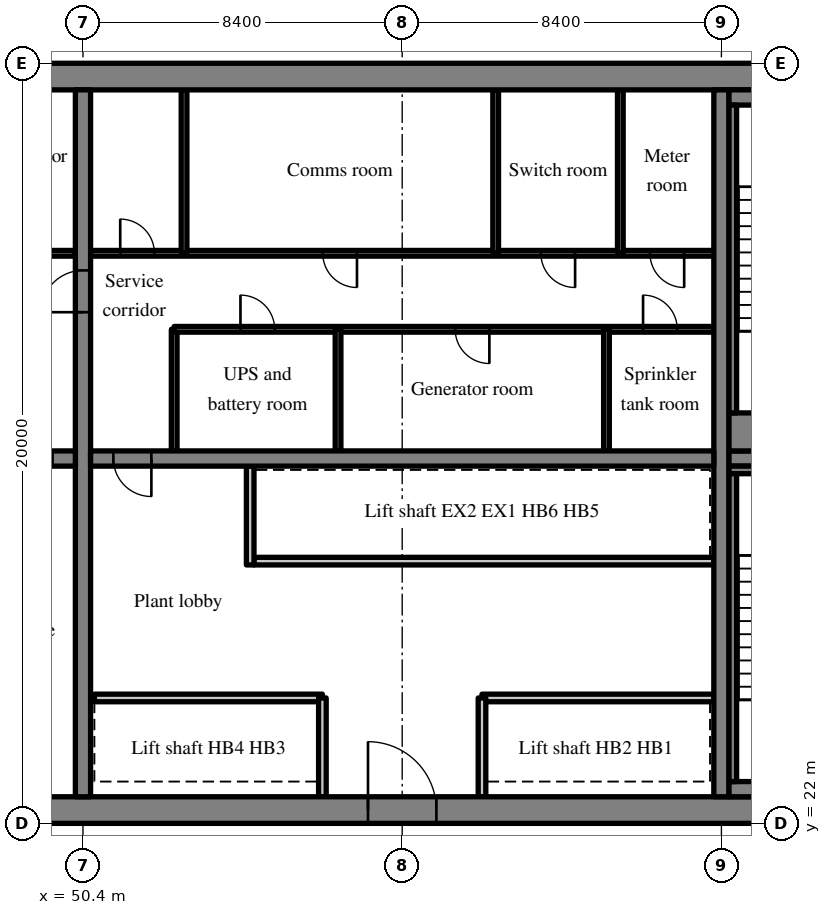
"""IFC4 building model, lengths in metres.
Left out: names, types, materials, properties, quantities, classifications, styles, units other than length and angle.
Written with IfcOpenShell. Run it as: python <this file> out.ifc"""

import sys

from ifc_helpers import new_model, si_unit, direction, frame, frame_2d, origin, place, context, subcontext, project, spatial, rectangle, extrude, source, transform, mapped, element, fill, save


model = new_model("IFC4")
c1 = context("Model", 3, precision=1e-05, world=origin(), true_north=direction((0.0, 1.0)))
c2 = subcontext(c1, "Body", "Model", "MODEL_VIEW")
j1 = project(units=[si_unit("LENGTHUNIT", "METRE"), si_unit("PLANEANGLEUNIT", "RADIAN")], contexts=[c1])
p1 = place(None, origin())
s1 = spatial("IfcSite", under=j1, at=p1, CompositionType="ELEMENT")
p2 = place(p1, origin())
s2 = spatial("IfcBuilding", under=s1, at=p2, CompositionType="ELEMENT")
p3 = place(p2, frame((0.0, 0.0, 201.0)))
s3 = spatial("IfcBuildingStorey", under=s2, at=p3, CompositionType="ELEMENT", Elevation=201.0)
m1 = source(origin(), c2, "Body", "SweptSolid", [
    extrude(rectangle(XDim=50.4, YDim=0.7, at=frame_2d((25.2, 0.0))), origin(), (0.0, 0.0, 1.0), 5.12),
])
p4 = place(p3, frame((25.2, 22.35, 0.0), z_axis=(0.0, 0.0, 1.0), x_axis=(1.0, 0.0, 0.0)))
e1 = element("IfcWall", 1, at=p4, inside=s3, PredefinedType="SHEAR", context=c2, shape_type="MappedRepresentation", body=[
    mapped(m1, transform((0.0, 0.0, 0.0), scale=1.0)),
])
m2 = source(origin(), c2, "Body", "SweptSolid", [
    extrude(rectangle(XDim=1.2, YDim=2.1, at=frame_2d((0.6, 1.05))), frame((0.0, 0.36, 0.0), z_axis=(0.0, -1.0, 0.0), x_axis=(1.0, 0.0, 0.0)), (0.0, 0.0, 1.0), 0.72),
])
p5 = place(p4, frame((22.25, 0.0, 0.0)))
e2 = element("IfcOpeningElement", 2, at=p5, cuts=e1, PredefinedType="OPENING", context=c2, shape_type="MappedRepresentation", body=[
    mapped(m2, transform((0.0, 0.0, 0.0), scale=1.0)),
])
m3 = source(origin(), c2, "Body", "SweptSolid", [
    extrude(rectangle(XDim=0.9, YDim=2.1, at=frame_2d((0.45, 1.05))), frame((0.0, 0.36, 0.0), z_axis=(0.0, -1.0, 0.0), x_axis=(1.0, 0.0, 0.0)), (0.0, 0.0, 1.0), 0.72),
])
p6 = place(p4, frame((15.75, 0.0, 0.0)))
e3 = element("IfcOpeningElement", 3, at=p6, cuts=e1, PredefinedType="OPENING", context=c2, shape_type="MappedRepresentation", body=[
    mapped(m3, transform((0.0, 0.0, 0.0), scale=1.0)),
])
p7 = place(p4, frame((18.75, 0.0, 0.0)))
e4 = element("IfcOpeningElement", 4, at=p7, cuts=e1, PredefinedType="OPENING", context=c2, shape_type="MappedRepresentation", body=[
    mapped(m3, transform((0.0, 0.0, 0.0), scale=1.0)),
])
p8 = place(p4, frame((11.2, 0.0, 0.0)))
e5 = element("IfcOpeningElement", 5, at=p8, cuts=e1, PredefinedType="OPENING", context=c2, shape_type="MappedRepresentation", body=[
    mapped(m3, transform((0.0, 0.0, 0.0), scale=1.0)),
])
m4 = source(origin(), c2, "Body", "SweptSolid", [
    extrude(rectangle(XDim=1.8, YDim=2.1, at=frame_2d((0.9, 1.05))), frame((0.0, 0.36, 0.0), z_axis=(0.0, -1.0, 0.0), x_axis=(1.0, 0.0, 0.0)), (0.0, 0.0, 1.0), 0.72),
])
p9 = place(p4, frame((32.7, 0.0, 0.0)))
e6 = element("IfcOpeningElement", 6, at=p9, cuts=e1, PredefinedType="OPENING", context=c2, shape_type="MappedRepresentation", body=[
    mapped(m4, transform((0.0, 0.0, 0.0), scale=1.0)),
])
p10 = place(p4, frame((6.475, 0.0, 0.0)))
e7 = element("IfcOpeningElement", 7, at=p10, cuts=e1, PredefinedType="OPENING", context=c2, shape_type="MappedRepresentation", body=[
    mapped(m2, transform((0.0, 0.0, 0.0), scale=1.0)),
])
p11 = place(p4, frame((47.875, 0.0, 0.0)))
e8 = element("IfcOpeningElement", 8, at=p11, cuts=e1, PredefinedType="OPENING", context=c2, shape_type="MappedRepresentation", body=[
    mapped(m2, transform((0.0, 0.0, 0.0), scale=1.0)),
])
p12 = place(p3, frame((25.2, 41.65, 0.0), z_axis=(0.0, 0.0, 1.0), x_axis=(1.0, 0.0, 0.0)))
e9 = element("IfcWall", 9, at=p12, inside=s3, PredefinedType="SHEAR", context=c2, shape_type="MappedRepresentation", body=[
    mapped(m1, transform((0.0, 0.0, 0.0), scale=1.0)),
])
m5 = source(origin(), c2, "Body", "SweptSolid", [
    extrude(rectangle(XDim=18.6, YDim=0.4, at=frame_2d((9.3, 0.0))), origin(), (0.0, 0.0, 1.0), 5.12),
])
p13 = place(p3, frame((50.4, 22.7, 0.0), z_axis=(0.0, 0.0, 1.0), x_axis=(0.0, 1.0, 0.0)))
e10 = element("IfcWall", 10, at=p13, inside=s3, PredefinedType="SHEAR", context=c2, shape_type="MappedRepresentation", body=[
    mapped(m5, transform((0.0, 0.0, 0.0), scale=1.0)),
])
m6 = source(origin(), c2, "Body", "SweptSolid", [
    extrude(rectangle(XDim=1.1, YDim=2.1, at=frame_2d((0.55, 1.05))), frame((0.0, 0.21, 0.0), z_axis=(0.0, -1.0, 0.0), x_axis=(1.0, 0.0, 0.0)), (0.0, 0.0, 1.0), 0.42),
])
p14 = place(p13, frame((12.75, 0.0, 0.0)))
e11 = element("IfcOpeningElement", 11, at=p14, cuts=e10, PredefinedType="OPENING", context=c2, shape_type="MappedRepresentation", body=[
    mapped(m6, transform((0.0, 0.0, 0.0), scale=1.0)),
])
p15 = place(p3, frame((67.2, 22.7, 0.0), z_axis=(0.0, 0.0, 1.0), x_axis=(0.0, 1.0, 0.0)))
e12 = element("IfcWall", 12, at=p15, inside=s3, PredefinedType="SHEAR", context=c2, shape_type="MappedRepresentation", body=[
    mapped(m5, transform((0.0, 0.0, 0.0), scale=1.0)),
])
m7 = source(origin(), c2, "Body", "SweptSolid", [
    extrude(rectangle(XDim=16.4, YDim=0.4, at=frame_2d((8.2, 0.0))), origin(), (0.0, 0.0, 1.0), 5.12),
])
p16 = place(p3, frame((33.8, 31.6, 0.0), z_axis=(0.0, 0.0, 1.0), x_axis=(1.0, 0.0, 0.0)))
e13 = element("IfcWall", 13, at=p16, inside=s3, PredefinedType="SHEAR", context=c2, shape_type="MappedRepresentation", body=[
    mapped(m7, transform((0.0, 0.0, 0.0), scale=1.0)),
])
m8 = source(origin(), c2, "Body", "SweptSolid", [
    extrude(rectangle(XDim=1.0, YDim=2.1, at=frame_2d((0.5, 1.05))), frame((0.0, 0.21, 0.0), z_axis=(0.0, -1.0, 0.0), x_axis=(1.0, 0.0, 0.0)), (0.0, 0.0, 1.0), 0.42),
])
p17 = place(p16, frame((14.8, 0.0, 0.0)))
e14 = element("IfcOpeningElement", 14, at=p17, cuts=e13, PredefinedType="OPENING", context=c2, shape_type="MappedRepresentation", body=[
    mapped(m8, transform((0.0, 0.0, 0.0), scale=1.0)),
])
p18 = place(p3, frame((50.6, 31.6, 0.0), z_axis=(0.0, 0.0, 1.0), x_axis=(1.0, 0.0, 0.0)))
e15 = element("IfcWall", 15, at=p18, inside=s3, PredefinedType="SHEAR", context=c2, shape_type="MappedRepresentation", body=[
    mapped(m7, transform((0.0, 0.0, 0.0), scale=1.0)),
])
p19 = place(p18, frame((0.6, 0.0, 0.0)))
e16 = element("IfcOpeningElement", 16, at=p19, cuts=e15, PredefinedType="OPENING", context=c2, shape_type="MappedRepresentation", body=[
    mapped(m8, transform((0.0, 0.0, 0.0), scale=1.0)),
])
m9 = source(origin(), c2, "Body", "SweptSolid", [
    extrude(rectangle(XDim=7.5, YDim=0.4, at=frame_2d((3.75, 0.0))), origin(), (0.0, 0.0, 1.0), 5.12),
])
p20 = place(p3, frame((67.4, 31.6, 0.0), z_axis=(0.0, 0.0, 1.0), x_axis=(1.0, 0.0, 0.0)))
e17 = element("IfcWall", 17, at=p20, inside=s3, PredefinedType="SHEAR", context=c2, shape_type="MappedRepresentation", body=[
    mapped(m9, transform((0.0, 0.0, 0.0), scale=1.0)),
])
p21 = place(p20, frame((5.725, 0.0, 0.0)))
e18 = element("IfcOpeningElement", 18, at=p21, cuts=e17, PredefinedType="OPENING", context=c2, shape_type="MappedRepresentation", body=[
    mapped(m6, transform((0.0, 0.0, 0.0), scale=1.0)),
])
m10 = source(origin(), c2, "Body", "SweptSolid", [
    extrude(rectangle(XDim=16.4, YDim=0.15, at=frame_2d((8.2, 0.0))), origin(), (0.0, 0.0, 1.0), 5.12),
])
p22 = place(p3, frame((33.8, 37.0, 0.0), z_axis=(0.0, 0.0, 1.0), x_axis=(1.0, 0.0, 0.0)))
e19 = element("IfcWall", 19, at=p22, inside=s3, PredefinedType="PARTITIONING", context=c2, shape_type="MappedRepresentation", body=[
    mapped(m10, transform((0.0, 0.0, 0.0), scale=1.0)),
])
m11 = source(origin(), c2, "Body", "SweptSolid", [
    extrude(rectangle(XDim=0.9, YDim=2.1, at=frame_2d((0.45, 1.05))), frame((0.0, 0.085, 0.0), z_axis=(0.0, -1.0, 0.0), x_axis=(1.0, 0.0, 0.0)), (0.0, 0.0, 1.0), 0.17),
])
p23 = place(p22, frame((3.24, 0.0, 0.0)))
e20 = element("IfcOpeningElement", 20, at=p23, cuts=e19, PredefinedType="OPENING", context=c2, shape_type="MappedRepresentation", body=[
    mapped(m11, transform((0.0, 0.0, 0.0), scale=1.0)),
])
p24 = place(p22, frame((8.16, 0.0, 0.0)))
e21 = element("IfcOpeningElement", 21, at=p24, cuts=e19, PredefinedType="OPENING", context=c2, shape_type="MappedRepresentation", body=[
    mapped(m11, transform((0.0, 0.0, 0.0), scale=1.0)),
])
p25 = place(p22, frame((11.44, 0.0, 0.0)))
e22 = element("IfcOpeningElement", 22, at=p25, cuts=e19, PredefinedType="OPENING", context=c2, shape_type="MappedRepresentation", body=[
    mapped(m11, transform((0.0, 0.0, 0.0), scale=1.0)),
])
p26 = place(p22, frame((14.72, 0.0, 0.0)))
e23 = element("IfcOpeningElement", 23, at=p26, cuts=e19, PredefinedType="OPENING", context=c2, shape_type="MappedRepresentation", body=[
    mapped(m11, transform((0.0, 0.0, 0.0), scale=1.0)),
])
m12 = source(origin(), c2, "Body", "SweptSolid", [
    extrude(rectangle(XDim=6.1, YDim=0.2, at=frame_2d((3.05, 0.0))), origin(), (0.0, 0.0, 1.0), 5.12),
])
p27 = place(p3, frame((67.0, 25.3, 0.0), z_axis=(0.0, 0.0, 1.0), x_axis=(-1.0, 0.0, 0.0)))
e24 = element("IfcWall", 24, at=p27, inside=s3, PredefinedType="SOLIDWALL", context=c2, shape_type="MappedRepresentation", body=[
    mapped(m12, transform((0.0, 0.0, 0.0), scale=1.0)),
])
m13 = source(origin(), c2, "Body", "SweptSolid", [
    extrude(rectangle(XDim=6.0, YDim=0.2, at=frame_2d((3.0, 0.0))), origin(), (0.0, 0.0, 1.0), 5.12),
])
p28 = place(p3, frame((56.7, 25.3, 0.0), z_axis=(0.0, 0.0, 1.0), x_axis=(-1.0, 0.0, 0.0)))
e25 = element("IfcWall", 25, at=p28, inside=s3, PredefinedType="SOLIDWALL", context=c2, shape_type="MappedRepresentation", body=[
    mapped(m13, transform((0.0, 0.0, 0.0), scale=1.0)),
])
m14 = source(origin(), c2, "Body", "SweptSolid", [
    extrude(rectangle(XDim=12.1, YDim=0.2, at=frame_2d((6.05, 0.0))), origin(), (0.0, 0.0, 1.0), 5.12),
])
p29 = place(p3, frame((67.0, 28.9, 0.0), z_axis=(0.0, 0.0, 1.0), x_axis=(-1.0, 0.0, 0.0)))
e26 = element("IfcWall", 26, at=p29, inside=s3, PredefinedType="SOLIDWALL", context=c2, shape_type="MappedRepresentation", body=[
    mapped(m14, transform((0.0, 0.0, 0.0), scale=1.0)),
])
m15 = source(origin(), c2, "Body", "SweptSolid", [
    extrude(rectangle(XDim=2.6, YDim=0.2, at=frame_2d((1.3, 0.0))), origin(), (0.0, 0.0, 1.0), 5.12),
])
for number, where, z_axis, x_axis in (
    (27, (60.9, 22.7, 0.0), (0.0, 0.0, 1.0), (0.0, 1.0, 0.0)),
    (28, (56.7, 22.7, 0.0), (0.0, 0.0, 1.0), (0.0, 1.0, 0.0)),
):
    element("IfcWall", number, at=place(p3, frame(where, z_axis=z_axis, x_axis=x_axis)), inside=s3, PredefinedType="SOLIDWALL", context=c2, shape_type="MappedRepresentation", body=[
        mapped(m15, transform((0.0, 0.0, 0.0), scale=1.0)),
    ])
m16 = source(origin(), c2, "Body", "SweptSolid", [
    extrude(rectangle(XDim=2.6, YDim=0.2, at=frame_2d((1.3, 0.0))), origin(), (0.0, 0.0, 1.0), 5.12),
])
p30 = place(p3, frame((54.8, 28.8, 0.0), z_axis=(0.0, 0.0, 1.0), x_axis=(0.0, 1.0, 0.0)))
e29 = element("IfcWall", 29, at=p30, inside=s3, PredefinedType="SOLIDWALL", context=c2, shape_type="MappedRepresentation", body=[
    mapped(m16, transform((0.0, 0.0, 0.0), scale=1.0)),
])
m17 = source(origin(), c2, "Body", "SweptSolid", [
    extrude(rectangle(XDim=3.2, YDim=0.15, at=frame_2d((1.6, 0.0))), origin(), (0.0, 0.0, 1.0), 5.12),
])
p31 = place(p3, frame((52.8, 31.8, 0.0), z_axis=(0.0, 0.0, 1.0), x_axis=(0.0, 1.0, 0.0)))
e30 = element("IfcWall", 30, at=p31, inside=s3, PredefinedType="PARTITIONING", context=c2, shape_type="MappedRepresentation", body=[
    mapped(m17, transform((0.0, 0.0, 0.0), scale=1.0)),
])
m18 = source(origin(), c2, "Body", "SweptSolid", [
    extrude(rectangle(XDim=14.2, YDim=0.15, at=frame_2d((7.1, 0.0))), origin(), (0.0, 0.0, 1.0), 5.12),
])
p32 = place(p3, frame((67.0, 35.0, 0.0), z_axis=(0.0, 0.0, 1.0), x_axis=(-1.0, 0.0, 0.0)))
e31 = element("IfcWall", 31, at=p32, inside=s3, PredefinedType="PARTITIONING", context=c2, shape_type="MappedRepresentation", body=[
    mapped(m18, transform((0.0, 0.0, 0.0), scale=1.0)),
])
p33 = place(p32, frame((0.962, 0.0, 0.0)))
e32 = element("IfcOpeningElement", 32, at=p33, cuts=e31, PredefinedType="OPENING", context=c2, shape_type="MappedRepresentation", body=[
    mapped(m11, transform((0.0, 0.0, 0.0), scale=1.0)),
])
p34 = place(p32, frame((5.906, 0.0, 0.0)))
e33 = element("IfcOpeningElement", 33, at=p34, cuts=e31, PredefinedType="OPENING", context=c2, shape_type="MappedRepresentation", body=[
    mapped(m11, transform((0.0, 0.0, 0.0), scale=1.0)),
])
p35 = place(p32, frame((11.556, 0.0, 0.0)))
e34 = element("IfcOpeningElement", 34, at=p35, cuts=e31, PredefinedType="OPENING", context=c2, shape_type="MappedRepresentation", body=[
    mapped(m11, transform((0.0, 0.0, 0.0), scale=1.0)),
])
p36 = place(p3, frame((67.0, 37.0, 0.0), z_axis=(0.0, 0.0, 1.0), x_axis=(-1.0, 0.0, 0.0)))
e35 = element("IfcWall", 35, at=p36, inside=s3, PredefinedType="PARTITIONING", context=c2, shape_type="MappedRepresentation", body=[
    mapped(m10, transform((0.0, 0.0, 0.0), scale=1.0)),
])
p37 = place(p36, frame((0.78, 0.0, 0.0)))
e36 = element("IfcOpeningElement", 36, at=p37, cuts=e35, PredefinedType="OPENING", context=c2, shape_type="MappedRepresentation", body=[
    mapped(m11, transform((0.0, 0.0, 0.0), scale=1.0)),
])
p38 = place(p36, frame((3.65, 0.0, 0.0)))
e37 = element("IfcOpeningElement", 37, at=p38, cuts=e35, PredefinedType="OPENING", context=c2, shape_type="MappedRepresentation", body=[
    mapped(m11, transform((0.0, 0.0, 0.0), scale=1.0)),
])
p39 = place(p36, frame((9.39, 0.0, 0.0)))
e38 = element("IfcOpeningElement", 38, at=p39, cuts=e35, PredefinedType="OPENING", context=c2, shape_type="MappedRepresentation", body=[
    mapped(m11, transform((0.0, 0.0, 0.0), scale=1.0)),
])
p40 = place(p36, frame((14.72, 0.0, 0.0)))
e39 = element("IfcOpeningElement", 39, at=p40, cuts=e35, PredefinedType="OPENING", context=c2, shape_type="MappedRepresentation", body=[
    mapped(m11, transform((0.0, 0.0, 0.0), scale=1.0)),
])
for number, where, z_axis, x_axis in (
    (40, (64.175, 31.8, 0.0), (0.0, 0.0, 1.0), (0.0, 1.0, 0.0)),
    (41, (57.112, 31.8, 0.0), (0.0, 0.0, 1.0), (0.0, 1.0, 0.0)),
):
    element("IfcWall", number, at=place(p3, frame(where, z_axis=z_axis, x_axis=x_axis)), inside=s3, PredefinedType="PARTITIONING", context=c2, shape_type="MappedRepresentation", body=[
        mapped(m17, transform((0.0, 0.0, 0.0), scale=1.0)),
    ])
m19 = source(origin(), c2, "Body", "SweptSolid", [
    extrude(rectangle(XDim=4.3, YDim=0.15, at=frame_2d((2.15, 0.0))), origin(), (0.0, 0.0, 1.0), 5.12),
])
for number, where, z_axis, x_axis in (
    (42, (64.54, 37.0, 0.0), (0.0, 0.0, 1.0), (0.0, 1.0, 0.0)),
    (43, (61.26, 37.0, 0.0), (0.0, 0.0, 1.0), (0.0, 1.0, 0.0)),
    (44, (53.06, 37.0, 0.0), (0.0, 0.0, 1.0), (0.0, 1.0, 0.0)),
):
    element("IfcWall", number, at=place(p3, frame(where, z_axis=z_axis, x_axis=x_axis)), inside=s3, PredefinedType="PARTITIONING", context=c2, shape_type="MappedRepresentation", body=[
        mapped(m19, transform((0.0, 0.0, 0.0), scale=1.0)),
    ])
m20 = source(origin(), c2, "Body", "SweptSolid", [
    extrude(rectangle(XDim=4.85, YDim=0.4, at=frame_2d((2.425, 0.0))), origin(), (0.0, 0.0, 1.0), 5.12),
])
p41 = place(p3, frame((67.4, 22.9, 0.0), z_axis=(0.0, 0.0, 1.0), x_axis=(1.0, 0.0, 0.0)))
e45 = element("IfcWall", 45, at=p41, inside=s3, PredefinedType="SOLIDWALL", context=c2, shape_type="MappedRepresentation", body=[
    mapped(m20, transform((0.0, 0.0, 0.0), scale=1.0)),
])
m21 = source(origin(), c2, "Body", "SweptSolid", [
    extrude(rectangle(XDim=4.85, YDim=0.2, at=frame_2d((2.425, 0.0))), origin(), (0.0, 0.0, 1.0), 5.12),
])
p42 = place(p3, frame((67.4, 31.3, 0.0), z_axis=(0.0, 0.0, 1.0), x_axis=(1.0, 0.0, 0.0)))
e46 = element("IfcWall", 46, at=p42, inside=s3, PredefinedType="SOLIDWALL", context=c2, shape_type="MappedRepresentation", body=[
    mapped(m21, transform((0.0, 0.0, 0.0), scale=1.0)),
])
m22 = source(origin(), c2, "Body", "SweptSolid", [
    extrude(rectangle(XDim=8.1, YDim=0.2, at=frame_2d((4.05, 0.0))), origin(), (0.0, 0.0, 1.0), 5.12),
])
p43 = place(p3, frame((67.5, 23.1, 0.0), z_axis=(0.0, 0.0, 1.0), x_axis=(0.0, 1.0, 0.0)))
e47 = element("IfcWall", 47, at=p43, inside=s3, PredefinedType="SOLIDWALL", context=c2, shape_type="MappedRepresentation", body=[
    mapped(m22, transform((0.0, 0.0, 0.0), scale=1.0)),
])
p44 = place(p3, frame((67.4, 41.1, 0.0), z_axis=(0.0, 0.0, 1.0), x_axis=(1.0, 0.0, 0.0)))
e48 = element("IfcWall", 48, at=p44, inside=s3, PredefinedType="SOLIDWALL", context=c2, shape_type="MappedRepresentation", body=[
    mapped(m20, transform((0.0, 0.0, 0.0), scale=1.0)),
])
m23 = source(origin(), c2, "Body", "SweptSolid", [
    extrude(rectangle(XDim=4.85, YDim=1.0, at=frame_2d((2.425, 0.0))), origin(), (0.0, 0.0, 1.0), 5.12),
])
p45 = place(p3, frame((67.4, 32.3, 0.0), z_axis=(0.0, 0.0, 1.0), x_axis=(1.0, 0.0, 0.0)))
e49 = element("IfcWall", 49, at=p45, inside=s3, PredefinedType="SOLIDWALL", context=c2, shape_type="MappedRepresentation", body=[
    mapped(m23, transform((0.0, 0.0, 0.0), scale=1.0)),
])
p46 = place(p3, frame((67.5, 32.8, 0.0), z_axis=(0.0, 0.0, 1.0), x_axis=(0.0, 1.0, 0.0)))
e50 = element("IfcWall", 50, at=p46, inside=s3, PredefinedType="SOLIDWALL", context=c2, shape_type="MappedRepresentation", body=[
    mapped(m22, transform((0.0, 0.0, 0.0), scale=1.0)),
])
m24 = source(origin(), c2, "Body", "SweptSolid", [
    extrude(rectangle(XDim=1.8, YDim=2.1, at=frame_2d((0.9, 1.05))), frame((0.0, 0.275, 0.0), z_axis=(0.0, -1.0, 0.0), x_axis=(1.0, 0.0, 0.0)), (0.0, 0.0, 1.0), 0.05),
])
p47 = place(p9, origin())
e51 = element("IfcDoor", 51, at=p47, inside=s3, OperationType="DOUBLE_DOOR_SINGLE_SWING", PredefinedType="DOOR", context=c2, shape_type="MappedRepresentation", body=[
    mapped(m24, transform((0.0, 0.0, 0.0), scale=1.0)),
])
fill(e6, e51)
m25 = source(origin(), c2, "Body", "SweptSolid", [
    extrude(rectangle(XDim=1.0, YDim=2.1, at=frame_2d((0.5, 1.05))), frame((0.0, 0.025, 0.0), z_axis=(0.0, -1.0, 0.0), x_axis=(1.0, 0.0, 0.0)), (0.0, 0.0, 1.0), 0.05),
])
p48 = place(p19, origin())
e52 = element("IfcDoor", 52, at=p48, inside=s3, OperationType="SINGLE_SWING_RIGHT", PredefinedType="DOOR", context=c2, shape_type="MappedRepresentation", body=[
    mapped(m25, transform((0.0, 0.0, 0.0), scale=1.0)),
])
fill(e16, e52)
m26 = source(origin(), c2, "Body", "SweptSolid", [
    extrude(rectangle(XDim=0.9, YDim=2.1, at=frame_2d((0.45, 1.05))), frame((0.0, 0.025, 0.0), z_axis=(0.0, -1.0, 0.0), x_axis=(1.0, 0.0, 0.0)), (0.0, 0.0, 1.0), 0.05),
])
p49 = place(p33, origin())
e53 = element("IfcDoor", 53, at=p49, inside=s3, OperationType="SINGLE_SWING_RIGHT", PredefinedType="DOOR", context=c2, shape_type="MappedRepresentation", body=[
    mapped(m26, transform((0.0, 0.0, 0.0), scale=1.0)),
])
fill(e32, e53)
p50 = place(p34, origin())
e54 = element("IfcDoor", 54, at=p50, inside=s3, OperationType="SINGLE_SWING_LEFT", PredefinedType="DOOR", context=c2, shape_type="MappedRepresentation", body=[
    mapped(m26, transform((0.0, 0.0, 0.0), scale=1.0)),
])
fill(e33, e54)
p51 = place(p35, origin())
e55 = element("IfcDoor", 55, at=p51, inside=s3, OperationType="SINGLE_SWING_RIGHT", PredefinedType="DOOR", context=c2, shape_type="MappedRepresentation", body=[
    mapped(m26, transform((0.0, 0.0, 0.0), scale=1.0)),
])
fill(e34, e55)
p52 = place(p37, origin())
e56 = element("IfcDoor", 56, at=p52, inside=s3, OperationType="SINGLE_SWING_LEFT", PredefinedType="DOOR", context=c2, shape_type="MappedRepresentation", body=[
    mapped(m26, transform((0.0, 0.0, 0.0), scale=1.0)),
])
fill(e36, e56)
p53 = place(p38, origin())
e57 = element("IfcDoor", 57, at=p53, inside=s3, OperationType="SINGLE_SWING_LEFT", PredefinedType="DOOR", context=c2, shape_type="MappedRepresentation", body=[
    mapped(m26, transform((0.0, 0.0, 0.0), scale=1.0)),
])
fill(e37, e57)
p54 = place(p39, origin())
e58 = element("IfcDoor", 58, at=p54, inside=s3, OperationType="SINGLE_SWING_LEFT", PredefinedType="DOOR", context=c2, shape_type="MappedRepresentation", body=[
    mapped(m26, transform((0.0, 0.0, 0.0), scale=1.0)),
])
fill(e38, e58)
p55 = place(p40, origin())
e59 = element("IfcDoor", 59, at=p55, inside=s3, OperationType="SINGLE_SWING_RIGHT", PredefinedType="DOOR", context=c2, shape_type="MappedRepresentation", body=[
    mapped(m26, transform((0.0, 0.0, 0.0), scale=1.0)),
])
fill(e39, e59)
m27 = source(origin(), c2, "Body", "SweptSolid", [
    extrude(rectangle(XDim=1.1, YDim=2.1, at=frame_2d((0.55, 1.05))), frame((0.0, 0.025, 0.0), z_axis=(0.0, -1.0, 0.0), x_axis=(1.0, 0.0, 0.0)), (0.0, 0.0, 1.0), 0.05),
])
p56 = place(p14, origin())
e60 = element("IfcDoor", 60, at=p56, inside=s3, OperationType="SINGLE_SWING_LEFT", PredefinedType="DOOR", context=c2, shape_type="MappedRepresentation", body=[
    mapped(m27, transform((0.0, 0.0, 0.0), scale=1.0)),
])
fill(e11, e60)
save(model, sys.argv[1])
